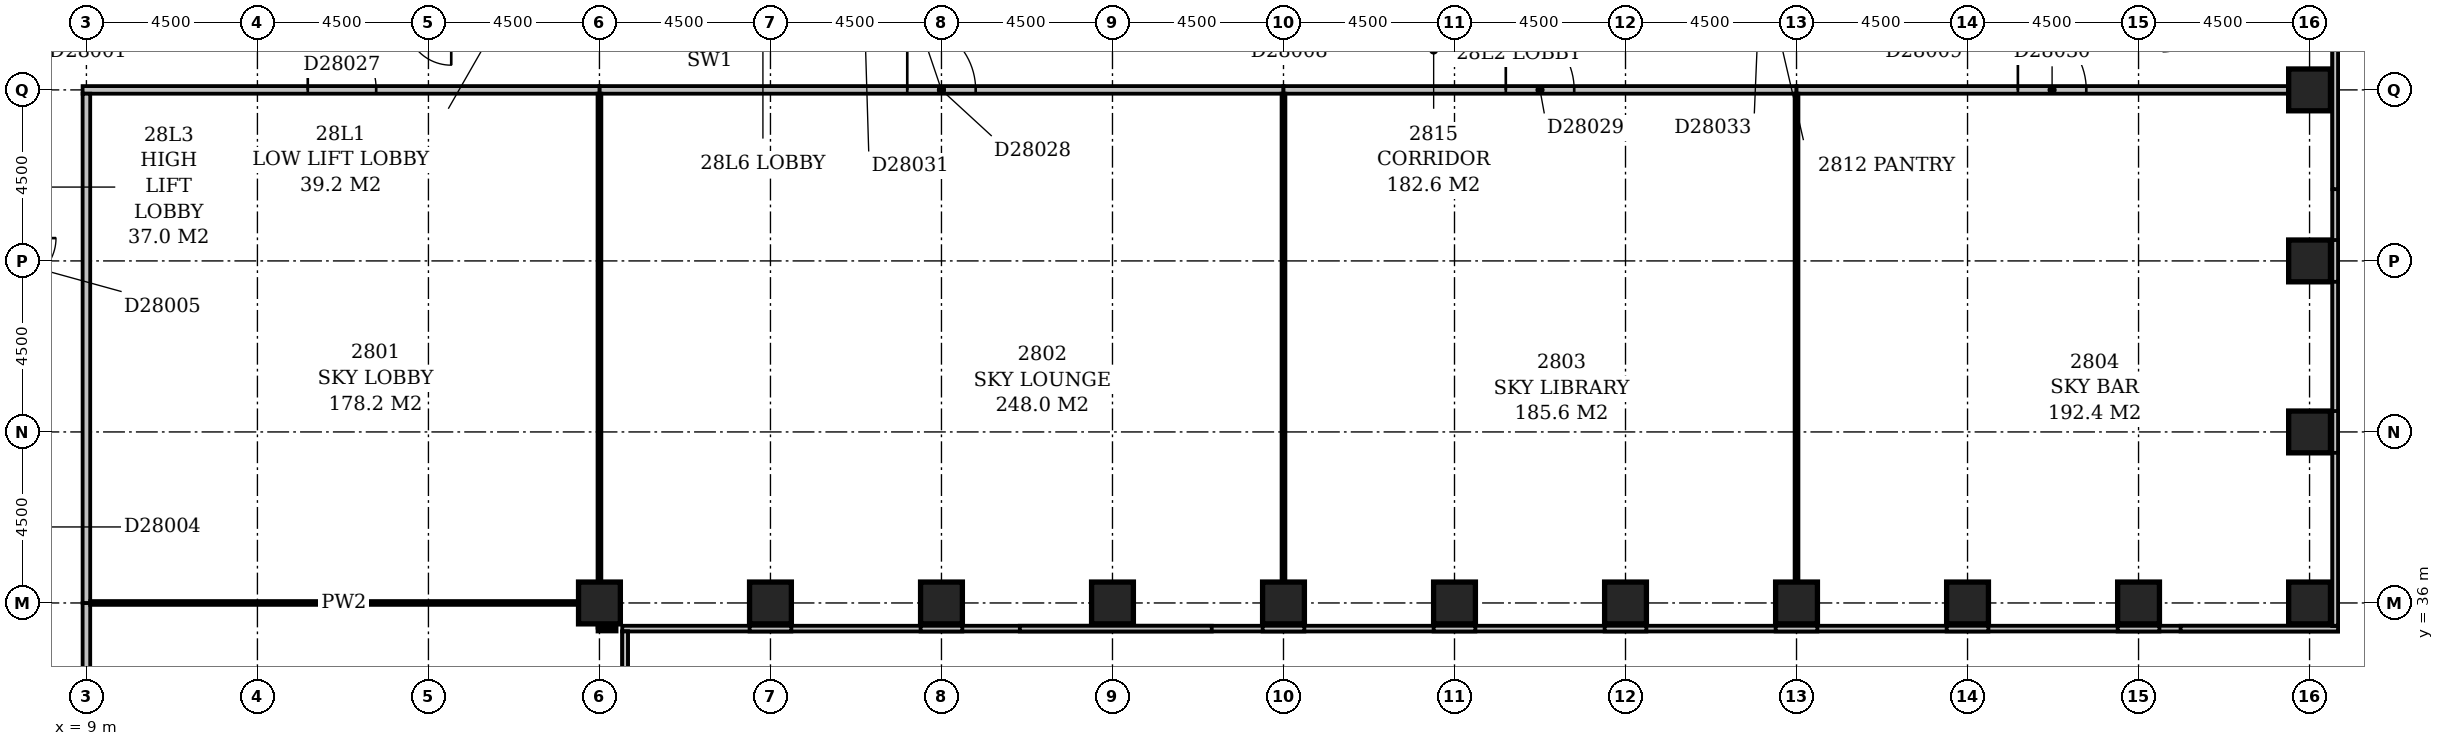
"""IFC4 building model, lengths in metres.
Left out: names, types, materials, properties, quantities, classifications, styles, units other than length and angle.
Written with IfcOpenShell. Run it as: python <this file> out.ifc"""

import sys

from ifc_helpers import new_model, si_unit, direction, frame, frame_2d, origin, origin_2d, place, context, subcontext, project, spatial, rectangle, extrude, element, fill, save


model = new_model("IFC4")
c1 = context("Model", 3, precision=1e-05, world=origin(), true_north=direction((0.0, 1.0)))
c2 = subcontext(c1, "Body", "Model", "MODEL_VIEW")
j1 = project(units=[si_unit("LENGTHUNIT", "METRE"), si_unit("PLANEANGLEUNIT", "RADIAN")], contexts=[c1])
p1 = place(None, origin())
s1 = spatial("IfcSite", under=j1, at=p1, CompositionType="ELEMENT")
p2 = place(p1, origin())
s2 = spatial("IfcBuilding", under=s1, at=p2, CompositionType="ELEMENT")
p3 = place(p2, frame((0.0, 0.0, 113.6)))
s3 = spatial("IfcBuildingStorey", under=s2, at=p3, CompositionType="ELEMENT", Elevation=113.6)
for number, where, z_axis, x_axis in (
    (1, (22.5, 36.0, -0.5), (0.0, 0.0, 1.0), (1.0, 0.0, 0.0)),
    (2, (27.0, 36.0, -0.5), (0.0, 0.0, 1.0), (1.0, 0.0, 0.0)),
    (3, (31.5, 36.0, -0.5), (0.0, 0.0, 1.0), (1.0, 0.0, 0.0)),
    (4, (36.0, 36.0, -0.5), (0.0, 0.0, 1.0), (1.0, 0.0, 0.0)),
    (5, (40.5, 36.0, -0.5), (0.0, 0.0, 1.0), (1.0, 0.0, 0.0)),
    (6, (45.0, 36.0, -0.5), (0.0, 0.0, 1.0), (1.0, 0.0, 0.0)),
    (7, (49.5, 36.0, -0.5), (0.0, 0.0, 1.0), (1.0, 0.0, 0.0)),
    (8, (54.0, 36.0, -0.5), (0.0, 0.0, 1.0), (1.0, 0.0, 0.0)),
    (9, (58.5, 36.0, -0.5), (0.0, 0.0, 1.0), (1.0, 0.0, 0.0)),
    (10, (63.0, 36.0, -0.5), (0.0, 0.0, 1.0), (1.0, 0.0, 0.0)),
    (11, (67.5, 36.0, -0.5), (0.0, 0.0, 1.0), (1.0, 0.0, 0.0)),
    (12, (67.5, 40.5, -0.5), (0.0, 0.0, 1.0), (1.0, 0.0, 0.0)),
    (13, (67.5, 45.0, -0.5), (0.0, 0.0, 1.0), (1.0, 0.0, 0.0)),
    (14, (67.5, 49.5, -0.5), (0.0, 0.0, 1.0), (1.0, 0.0, 0.0)),
):
    element("IfcColumn", number, at=place(p3, frame(where, z_axis=z_axis, x_axis=x_axis)), inside=s3, PredefinedType="COLUMN", context=c2, shape_type="SweptSolid", body=[
        extrude(rectangle(XDim=1.1, YDim=1.1, at=origin_2d()), origin(), (0.0, 0.0, 1.0), 6.2),
    ])
p4 = place(p3, frame((23.175, 17.4, 0.0), z_axis=(0.0, 0.0, 1.0), x_axis=(0.0, 1.0, 0.0)))
e15 = element("IfcWall", 15, at=p4, inside=s3, PredefinedType="STANDARD", context=c2, shape_type="SweptSolid", body=[
    extrude(rectangle(XDim=17.85, YDim=0.15, at=frame_2d((8.925, 0.0))), origin(), (0.0, 0.0, 1.0), 1.1),
])
p5 = place(p3, frame((23.1, 35.325, 0.0), z_axis=(0.0, 0.0, 1.0), x_axis=(1.0, 0.0, 0.0)))
e16 = element("IfcWall", 16, at=p5, inside=s3, PredefinedType="STANDARD", context=c2, shape_type="SweptSolid", body=[
    extrude(rectangle(XDim=45.15, YDim=0.15, at=frame_2d((22.575, 0.0))), origin(), (0.0, 0.0, 1.0), 1.1),
])
p6 = place(p3, frame((68.175, 35.4, 0.0), z_axis=(0.0, 0.0, 1.0), x_axis=(0.0, 1.0, 0.0)))
e17 = element("IfcWall", 17, at=p6, inside=s3, PredefinedType="STANDARD", context=c2, shape_type="SweptSolid", body=[
    extrude(rectangle(XDim=23.85, YDim=0.15, at=frame_2d((11.925, 0.0))), origin(), (0.0, 0.0, 1.0), 1.1),
])
p7 = place(p3, frame((23.175, 30.95, 1.1), z_axis=(0.0, 0.0, 1.0), x_axis=(0.0, 1.0, 0.0)))
e18 = element("IfcWall", 18, at=p7, inside=s3, PredefinedType="STANDARD", context=c2, shape_type="SweptSolid", body=[
    extrude(rectangle(XDim=4.3, YDim=0.15, at=frame_2d((2.15, 0.0))), origin(), (0.0, 0.0, 1.0), 4.0),
])
for number, where, z_axis, x_axis in (
    (19, (26.45, 35.325, 1.1), (0.0, 0.0, 1.0), (1.0, 0.0, 0.0)),
    (20, (30.95, 35.325, 1.1), (0.0, 0.0, 1.0), (1.0, 0.0, 0.0)),
):
    element("IfcWall", number, at=place(p3, frame(where, z_axis=z_axis, x_axis=x_axis)), inside=s3, PredefinedType="STANDARD", context=c2, shape_type="SweptSolid", body=[
        extrude(rectangle(XDim=1.1, YDim=0.15, at=frame_2d((0.55, 0.0))), origin(), (0.0, 0.0, 1.0), 4.0),
    ])
p8 = place(p3, frame((33.562, 35.325, 1.1), z_axis=(0.0, 0.0, 1.0), x_axis=(1.0, 0.0, 0.0)))
e21 = element("IfcWall", 21, at=p8, inside=s3, PredefinedType="STANDARD", context=c2, shape_type="SweptSolid", body=[
    extrude(rectangle(XDim=5.051, YDim=0.15, at=frame_2d((2.525, 0.0))), origin(), (0.0, 0.0, 1.0), 4.0),
])
for number, where, z_axis, x_axis in (
    (22, (39.95, 35.325, 1.1), (0.0, 0.0, 1.0), (1.0, 0.0, 0.0)),
    (23, (44.45, 35.325, 1.1), (0.0, 0.0, 1.0), (1.0, 0.0, 0.0)),
    (24, (48.95, 35.325, 1.1), (0.0, 0.0, 1.0), (1.0, 0.0, 0.0)),
    (25, (53.45, 35.325, 1.1), (0.0, 0.0, 1.0), (1.0, 0.0, 0.0)),
    (26, (57.95, 35.325, 1.1), (0.0, 0.0, 1.0), (1.0, 0.0, 0.0)),
    (27, (62.45, 35.325, 1.1), (0.0, 0.0, 1.0), (1.0, 0.0, 0.0)),
):
    element("IfcWall", number, at=place(p3, frame(where, z_axis=z_axis, x_axis=x_axis)), inside=s3, PredefinedType="STANDARD", context=c2, shape_type="SweptSolid", body=[
        extrude(rectangle(XDim=1.1, YDim=0.15, at=frame_2d((0.55, 0.0))), origin(), (0.0, 0.0, 1.0), 4.0),
    ])
p9 = place(p3, frame((64.105, 35.325, 1.1), z_axis=(0.0, 0.0, 1.0), x_axis=(1.0, 0.0, 0.0)))
e28 = element("IfcWall", 28, at=p9, inside=s3, PredefinedType="STANDARD", context=c2, shape_type="SweptSolid", body=[
    extrude(rectangle(XDim=4.145, YDim=0.15, at=frame_2d((2.072, 0.0))), origin(), (0.0, 0.0, 1.0), 4.0),
])
p10 = place(p3, frame((68.175, 35.4, 1.1), z_axis=(0.0, 0.0, 1.0), x_axis=(0.0, 1.0, 0.0)))
e29 = element("IfcWall", 29, at=p10, inside=s3, PredefinedType="STANDARD", context=c2, shape_type="SweptSolid", body=[
    extrude(rectangle(XDim=1.15, YDim=0.15, at=frame_2d((0.575, 0.0))), origin(), (0.0, 0.0, 1.0), 4.0),
])
for number, where, z_axis, x_axis in (
    (30, (68.175, 39.95, 1.1), (0.0, 0.0, 1.0), (0.0, 1.0, 0.0)),
    (31, (68.175, 44.45, 1.1), (0.0, 0.0, 1.0), (0.0, 1.0, 0.0)),
):
    element("IfcWall", number, at=place(p3, frame(where, z_axis=z_axis, x_axis=x_axis)), inside=s3, PredefinedType="STANDARD", context=c2, shape_type="SweptSolid", body=[
        extrude(rectangle(XDim=1.1, YDim=0.15, at=frame_2d((0.55, 0.0))), origin(), (0.0, 0.0, 1.0), 4.0),
    ])
p11 = place(p3, frame((68.175, 46.887, 1.1), z_axis=(0.0, 0.0, 1.0), x_axis=(0.0, 1.0, 0.0)))
e32 = element("IfcWall", 32, at=p11, inside=s3, PredefinedType="STANDARD", context=c2, shape_type="SweptSolid", body=[
    extrude(rectangle(XDim=12.363, YDim=0.15, at=frame_2d((6.181, 0.0))), origin(), (0.0, 0.0, 1.0), 4.0),
])
p12 = place(p3, frame((9.0, 18.1, 0.0), z_axis=(0.0, 0.0, 1.0), x_axis=(0.0, 1.0, 0.0)))
e33 = element("IfcWall", 33, at=p12, inside=s3, PredefinedType="PARTITIONING", context=c2, shape_type="SweptSolid", body=[
    extrude(rectangle(XDim=17.9, YDim=0.2, at=frame_2d((8.95, 0.0))), origin(), (0.0, 0.0, 1.0), 5.7),
])
p13 = place(p12, frame((9.525, 0.0, 0.0)))
e34 = element("IfcOpeningElement", 34, at=p13, cuts=e33, PredefinedType="OPENING", context=c2, shape_type="SweptSolid", body=[
    extrude(rectangle(XDim=1.8, YDim=2.4, at=frame_2d((0.9, 1.2))), frame((0.0, 0.112, 0.0), z_axis=(0.0, -1.0, 0.0), x_axis=(1.0, 0.0, 0.0)), (0.0, 0.0, 1.0), 0.224),
])
p14 = place(p3, frame((22.5, 35.35, 0.0), z_axis=(0.0, 0.0, 1.0), x_axis=(0.0, 1.0, 0.0)))
e35 = element("IfcWall", 35, at=p14, inside=s3, PredefinedType="PARTITIONING", context=c2, shape_type="SweptSolid", body=[
    extrude(rectangle(XDim=0.6, YDim=0.1, at=frame_2d((0.3, 0.0))), origin(), (0.0, 0.0, 1.0), 5.1),
])
p15 = place(p3, frame((22.95, 35.3, 0.0), z_axis=(0.0, 0.0, 1.0), x_axis=(-1.0, 0.0, 0.0)))
e36 = element("IfcWall", 36, at=p15, inside=s3, PredefinedType="PARTITIONING", context=c2, shape_type="SweptSolid", body=[
    extrude(rectangle(XDim=0.5, YDim=0.1, at=frame_2d((0.25, 0.0))), origin(), (0.0, 0.0, 1.0), 5.7),
])
p16 = place(p3, frame((9.0, 36.0, 0.0), z_axis=(0.0, 0.0, 1.0), x_axis=(0.0, 1.0, 0.0)))
e37 = element("IfcWall", 37, at=p16, inside=s3, PredefinedType="PARTITIONING", context=c2, shape_type="SweptSolid", body=[
    extrude(rectangle(XDim=13.4, YDim=0.2, at=frame_2d((6.7, 0.0))), origin(), (0.0, 0.0, 1.0), 5.7),
])
p17 = place(p3, frame((22.45, 36.0, 0.0), z_axis=(0.0, 0.0, 1.0), x_axis=(-1.0, 0.0, 0.0)))
e38 = element("IfcWall", 38, at=p17, inside=s3, PredefinedType="PARTITIONING", context=c2, shape_type="SweptSolid", body=[
    extrude(rectangle(XDim=13.35, YDim=0.1, at=frame_2d((6.675, 0.0))), origin(), (0.0, 0.0, 1.0), 5.7),
])
p18 = place(p3, frame((8.9, 49.5, 0.0), z_axis=(0.0, 0.0, 1.0), x_axis=(1.0, 0.0, 0.0)))
e39 = element("IfcWall", 39, at=p18, inside=s3, PredefinedType="PARTITIONING", context=c2, shape_type="SweptSolid", body=[
    extrude(rectangle(XDim=13.6, YDim=0.2, at=frame_2d((6.8, 0.0))), origin(), (0.0, 0.0, 1.0), 5.7),
])
p19 = place(p18, frame((5.925, 0.0, 0.0)))
e40 = element("IfcOpeningElement", 40, at=p19, cuts=e39, PredefinedType="OPENING", context=c2, shape_type="SweptSolid", body=[
    extrude(rectangle(XDim=1.8, YDim=2.4, at=frame_2d((0.9, 1.2))), frame((0.0, 0.112, 0.0), z_axis=(0.0, -1.0, 0.0), x_axis=(1.0, 0.0, 0.0)), (0.0, 0.0, 1.0), 0.224),
])
p20 = place(p3, frame((22.5, 49.4, 0.0), z_axis=(0.0, 0.0, 1.0), x_axis=(0.0, -1.0, 0.0)))
e41 = element("IfcWall", 41, at=p20, inside=s3, PredefinedType="PARTITIONING", context=c2, shape_type="SweptSolid", body=[
    extrude(rectangle(XDim=13.45, YDim=0.1, at=frame_2d((6.725, 0.0))), origin(), (0.0, 0.0, 1.0), 5.7),
])
p21 = place(p3, frame((22.5, 49.5, 0.0), z_axis=(0.0, 0.0, 1.0), x_axis=(1.0, 0.0, 0.0)))
e42 = element("IfcWall", 42, at=p21, inside=s3, PredefinedType="PARTITIONING", context=c2, shape_type="SweptSolid", body=[
    extrude(rectangle(XDim=18.0, YDim=0.2, at=frame_2d((9.0, 0.0))), origin(), (0.0, 0.0, 1.0), 5.7),
])
p22 = place(p21, frame((8.1, 0.0, 0.0)))
e43 = element("IfcOpeningElement", 43, at=p22, cuts=e42, PredefinedType="OPENING", context=c2, shape_type="SweptSolid", body=[
    extrude(rectangle(XDim=1.8, YDim=2.4, at=frame_2d((0.9, 1.2))), frame((0.0, 0.112, 0.0), z_axis=(0.0, -1.0, 0.0), x_axis=(1.0, 0.0, 0.0)), (0.0, 0.0, 1.0), 0.224),
])
p23 = place(p3, frame((40.5, 49.4, 0.0), z_axis=(0.0, 0.0, 1.0), x_axis=(0.0, -1.0, 0.0)))
e44 = element("IfcWall", 44, at=p23, inside=s3, PredefinedType="PARTITIONING", context=c2, shape_type="SweptSolid", body=[
    extrude(rectangle(XDim=13.4, YDim=0.1, at=frame_2d((6.7, 0.0))), origin(), (0.0, 0.0, 1.0), 5.7),
])
p24 = place(p3, frame((40.5, 49.5, 0.0), z_axis=(0.0, 0.0, 1.0), x_axis=(1.0, 0.0, 0.0)))
e45 = element("IfcWall", 45, at=p24, inside=s3, PredefinedType="PARTITIONING", context=c2, shape_type="SweptSolid", body=[
    extrude(rectangle(XDim=13.5, YDim=0.2, at=frame_2d((6.75, 0.0))), origin(), (0.0, 0.0, 1.0), 5.7),
])
p25 = place(p24, frame((5.85, 0.0, 0.0)))
e46 = element("IfcOpeningElement", 46, at=p25, cuts=e45, PredefinedType="OPENING", context=c2, shape_type="SweptSolid", body=[
    extrude(rectangle(XDim=1.8, YDim=2.4, at=frame_2d((0.9, 1.2))), frame((0.0, 0.112, 0.0), z_axis=(0.0, -1.0, 0.0), x_axis=(1.0, 0.0, 0.0)), (0.0, 0.0, 1.0), 0.224),
])
p26 = place(p3, frame((54.0, 49.4, 0.0), z_axis=(0.0, 0.0, 1.0), x_axis=(0.0, -1.0, 0.0)))
e47 = element("IfcWall", 47, at=p26, inside=s3, PredefinedType="PARTITIONING", context=c2, shape_type="SweptSolid", body=[
    extrude(rectangle(XDim=13.4, YDim=0.1, at=frame_2d((6.7, 0.0))), origin(), (0.0, 0.0, 1.0), 5.0),
])
p27 = place(p3, frame((54.0, 49.5, 0.0), z_axis=(0.0, 0.0, 1.0), x_axis=(1.0, 0.0, 0.0)))
e48 = element("IfcWall", 48, at=p27, inside=s3, PredefinedType="PARTITIONING", context=c2, shape_type="SweptSolid", body=[
    extrude(rectangle(XDim=13.5, YDim=0.2, at=frame_2d((6.75, 0.0))), origin(), (0.0, 0.0, 1.0), 5.7),
])
p28 = place(p27, frame((5.825, 0.0, 0.0)))
e49 = element("IfcOpeningElement", 49, at=p28, cuts=e48, PredefinedType="OPENING", context=c2, shape_type="SweptSolid", body=[
    extrude(rectangle(XDim=1.8, YDim=2.4, at=frame_2d((0.9, 1.2))), frame((0.0, 0.112, 0.0), z_axis=(0.0, -1.0, 0.0), x_axis=(1.0, 0.0, 0.0)), (0.0, 0.0, 1.0), 0.224),
])
p29 = place(p19, origin())
e50 = element("IfcDoor", 50, at=p29, inside=s3, OperationType="DOUBLE_DOOR_SINGLE_SWING", PredefinedType="DOOR", context=c2, shape_type="SweptSolid", body=[
    extrude(rectangle(XDim=1.8, YDim=2.4, at=frame_2d((0.9, 1.2))), frame((0.0, 0.025, 0.0), z_axis=(0.0, -1.0, 0.0), x_axis=(1.0, 0.0, 0.0)), (0.0, 0.0, 1.0), 0.05),
])
fill(e40, e50)
p30 = place(p22, origin())
e51 = element("IfcDoor", 51, at=p30, inside=s3, OperationType="DOUBLE_DOOR_SINGLE_SWING", PredefinedType="DOOR", context=c2, shape_type="SweptSolid", body=[
    extrude(rectangle(XDim=1.8, YDim=2.4, at=frame_2d((0.9, 1.2))), frame((0.0, 0.025, 0.0), z_axis=(0.0, -1.0, 0.0), x_axis=(1.0, 0.0, 0.0)), (0.0, 0.0, 1.0), 0.05),
])
fill(e43, e51)
p31 = place(p25, origin())
e52 = element("IfcDoor", 52, at=p31, inside=s3, OperationType="DOUBLE_DOOR_SINGLE_SWING", PredefinedType="DOOR", context=c2, shape_type="SweptSolid", body=[
    extrude(rectangle(XDim=1.8, YDim=2.4, at=frame_2d((0.9, 1.2))), frame((0.0, 0.025, 0.0), z_axis=(0.0, -1.0, 0.0), x_axis=(1.0, 0.0, 0.0)), (0.0, 0.0, 1.0), 0.05),
])
fill(e46, e52)
p32 = place(p28, origin())
e53 = element("IfcDoor", 53, at=p32, inside=s3, OperationType="DOUBLE_DOOR_SINGLE_SWING", PredefinedType="DOOR", context=c2, shape_type="SweptSolid", body=[
    extrude(rectangle(XDim=1.8, YDim=2.4, at=frame_2d((0.9, 1.2))), frame((0.0, 0.025, 0.0), z_axis=(0.0, -1.0, 0.0), x_axis=(1.0, 0.0, 0.0)), (0.0, 0.0, 1.0), 0.05),
])
fill(e49, e53)
save(model, sys.argv[1])
